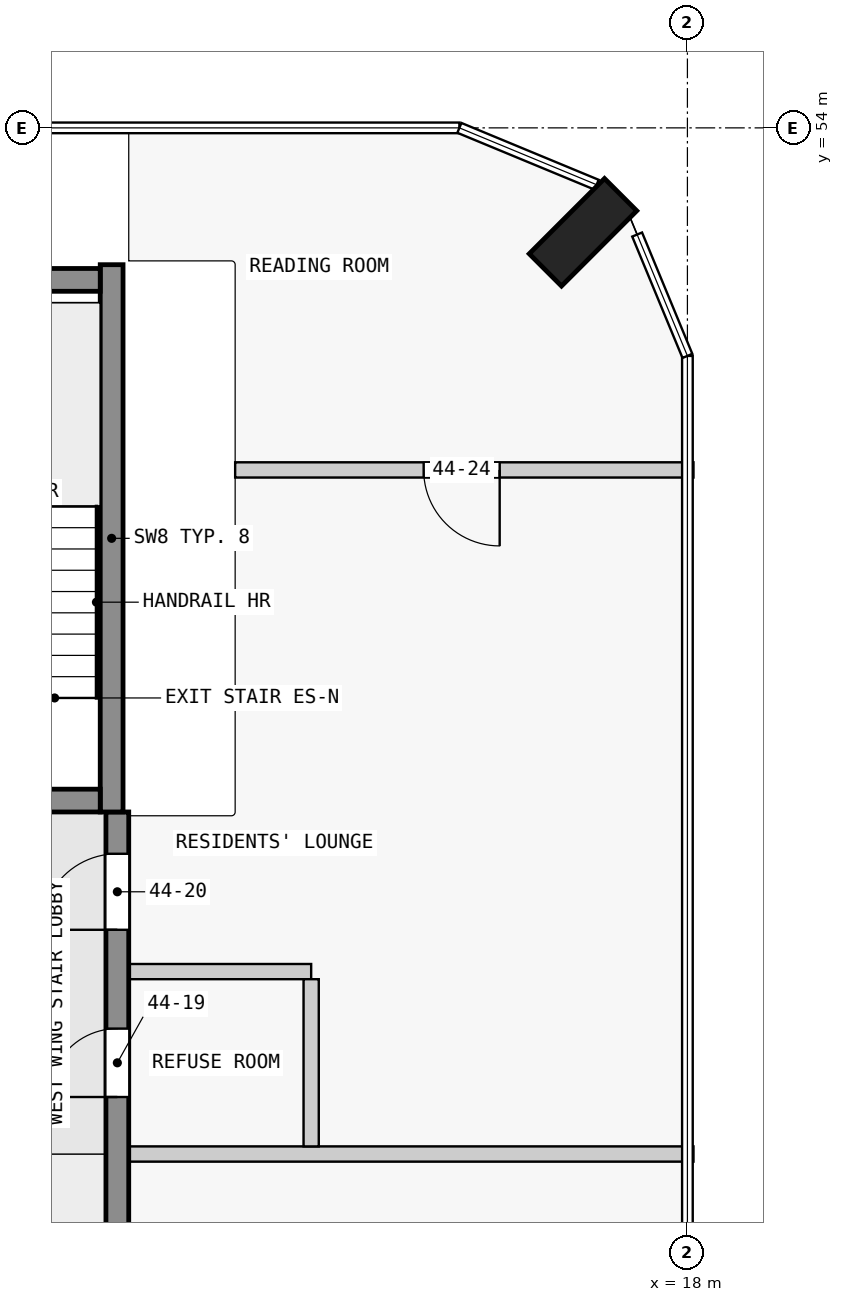
"""IFC4 building model, lengths in metres.
Left out: names, types, materials, properties, quantities, classifications, styles, units other than length and angle.
Written with IfcOpenShell. Run it as: python <this file> out.ifc"""

import sys

from ifc_helpers import new_model, si_unit, direction, frame, frame_2d, origin, origin_2d, place, context, subcontext, project, spatial, rectangle, extrude, element, fill, save


model = new_model("IFC4")
c1 = context("Model", 3, precision=1e-05, world=origin(), true_north=direction((0.0, 1.0)))
c2 = subcontext(c1, "Body", "Model", "MODEL_VIEW")
j1 = project(units=[si_unit("LENGTHUNIT", "METRE"), si_unit("PLANEANGLEUNIT", "RADIAN")], contexts=[c1])
p1 = place(None, origin())
s1 = spatial("IfcSite", under=j1, at=p1, CompositionType="ELEMENT")
p2 = place(p1, origin())
s2 = spatial("IfcBuilding", under=s1, at=p2, CompositionType="ELEMENT")
p3 = place(p2, frame((0.0, 0.0, 170.9)))
s3 = spatial("IfcBuildingStorey", under=s2, at=p3, CompositionType="ELEMENT", Elevation=170.9)
p4 = place(p3, frame((16.626, 52.626, 0.0), z_axis=(0.0, 0.0, 1.0), x_axis=(-0.707106781187, 0.707106781187, 0.0)))
e1 = element("IfcColumn", 1, at=p4, inside=s3, PredefinedType="COLUMN", context=c2, shape_type="SweptSolid", body=[
    extrude(rectangle(XDim=0.6, YDim=1.4, at=origin_2d()), origin(), (0.0, 0.0, 1.0), 3.5),
])
p5 = place(p3, frame((7.725, 45.15, 0.0), z_axis=(0.0, 0.0, 1.0), x_axis=(1.0, 0.0, 0.0)))
e2 = element("IfcWall", 2, at=p5, inside=s3, PredefinedType="SHEAR", context=c2, shape_type="SweptSolid", body=[
    extrude(rectangle(XDim=2.55, YDim=0.3, at=frame_2d((1.275, 0.0))), origin(), (0.0, 0.0, 1.0), 3.5),
])
p6 = place(p5, frame((0.725, 0.0, 0.0)))
e3 = element("IfcOpeningElement", 3, at=p6, cuts=e2, PredefinedType="OPENING", context=c2, shape_type="SweptSolid", body=[
    extrude(rectangle(XDim=1.1, YDim=2.1, at=frame_2d((0.55, 1.05))), frame((0.0, 0.16, 0.0), z_axis=(0.0, -1.0, 0.0), x_axis=(1.0, 0.0, 0.0)), (0.0, 0.0, 1.0), 0.32),
])
p7 = place(p3, frame((7.725, 52.0, 0.0), z_axis=(0.0, 0.0, 1.0), x_axis=(1.0, 0.0, 0.0)))
e4 = element("IfcWall", 4, at=p7, inside=s3, PredefinedType="SHEAR", context=c2, shape_type="SweptSolid", body=[
    extrude(rectangle(XDim=2.55, YDim=0.3, at=frame_2d((1.275, 0.0))), origin(), (0.0, 0.0, 1.0), 3.5),
])
p8 = place(p3, frame((10.425, 45.0, 0.0), z_axis=(0.0, 0.0, 1.0), x_axis=(0.0, 1.0, 0.0)))
e5 = element("IfcWall", 5, at=p8, inside=s3, PredefinedType="SHEAR", context=c2, shape_type="SweptSolid", body=[
    extrude(rectangle(XDim=7.2, YDim=0.3, at=frame_2d((3.6, 0.0))), origin(), (0.0, 0.0, 1.0), 3.5),
])
p9 = place(p3, frame((10.5, 18.0, 0.0), z_axis=(0.0, 0.0, 1.0), x_axis=(0.0, 1.0, 0.0)))
e6 = element("IfcWall", 6, at=p9, inside=s3, PredefinedType="SHEAR", context=c2, shape_type="SweptSolid", body=[
    extrude(rectangle(XDim=27.0, YDim=0.3, at=frame_2d((13.5, 0.0))), origin(), (0.0, 0.0, 1.0), 3.25),
])
p10 = place(p9, frame((1.75, 0.0, 0.0)))
e7 = element("IfcOpeningElement", 7, at=p10, cuts=e6, PredefinedType="OPENING", context=c2, shape_type="SweptSolid", body=[
    extrude(rectangle(XDim=1.0, YDim=2.1, at=frame_2d((0.5, 1.05))), frame((0.0, 0.16, 0.0), z_axis=(0.0, -1.0, 0.0), x_axis=(1.0, 0.0, 0.0)), (0.0, 0.0, 1.0), 0.32),
])
p11 = place(p9, frame((6.25, 0.0, 0.0)))
e8 = element("IfcOpeningElement", 8, at=p11, cuts=e6, PredefinedType="OPENING", context=c2, shape_type="SweptSolid", body=[
    extrude(rectangle(XDim=1.0, YDim=2.1, at=frame_2d((0.5, 1.05))), frame((0.0, 0.16, 0.0), z_axis=(0.0, -1.0, 0.0), x_axis=(1.0, 0.0, 0.0)), (0.0, 0.0, 1.0), 0.32),
])
p12 = place(p9, frame((10.75, 0.0, 0.0)))
e9 = element("IfcOpeningElement", 9, at=p12, cuts=e6, PredefinedType="OPENING", context=c2, shape_type="SweptSolid", body=[
    extrude(rectangle(XDim=1.0, YDim=2.1, at=frame_2d((0.5, 1.05))), frame((0.0, 0.16, 0.0), z_axis=(0.0, -1.0, 0.0), x_axis=(1.0, 0.0, 0.0)), (0.0, 0.0, 1.0), 0.32),
])
p13 = place(p9, frame((15.25, 0.0, 0.0)))
e10 = element("IfcOpeningElement", 10, at=p13, cuts=e6, PredefinedType="OPENING", context=c2, shape_type="SweptSolid", body=[
    extrude(rectangle(XDim=1.0, YDim=2.1, at=frame_2d((0.5, 1.05))), frame((0.0, 0.16, 0.0), z_axis=(0.0, -1.0, 0.0), x_axis=(1.0, 0.0, 0.0)), (0.0, 0.0, 1.0), 0.32),
])
p14 = place(p9, frame((19.75, 0.0, 0.0)))
e11 = element("IfcOpeningElement", 11, at=p14, cuts=e6, PredefinedType="OPENING", context=c2, shape_type="SweptSolid", body=[
    extrude(rectangle(XDim=1.0, YDim=2.1, at=frame_2d((0.5, 1.05))), frame((0.0, 0.16, 0.0), z_axis=(0.0, -1.0, 0.0), x_axis=(1.0, 0.0, 0.0)), (0.0, 0.0, 1.0), 0.32),
])
p15 = place(p9, frame((23.25, 0.0, 0.0)))
e12 = element("IfcOpeningElement", 12, at=p15, cuts=e6, PredefinedType="OPENING", context=c2, shape_type="SweptSolid", body=[
    extrude(rectangle(XDim=0.9, YDim=2.1, at=frame_2d((0.45, 1.05))), frame((0.0, 0.16, 0.0), z_axis=(0.0, -1.0, 0.0), x_axis=(1.0, 0.0, 0.0)), (0.0, 0.0, 1.0), 0.32),
])
p16 = place(p9, frame((25.45, 0.0, 0.0)))
e13 = element("IfcOpeningElement", 13, at=p16, cuts=e6, PredefinedType="OPENING", context=c2, shape_type="SweptSolid", body=[
    extrude(rectangle(XDim=1.0, YDim=2.1, at=frame_2d((0.5, 1.05))), frame((0.0, 0.16, 0.0), z_axis=(0.0, -1.0, 0.0), x_axis=(1.0, 0.0, 0.0)), (0.0, 0.0, 1.0), 0.32),
])
p17 = place(p3, frame((18.08, 40.5, 0.0), z_axis=(0.0, 0.0, 1.0), x_axis=(-1.0, 0.0, 0.0)))
e14 = element("IfcWall", 14, at=p17, inside=s3, PredefinedType="PARTITIONING", context=c2, shape_type="SweptSolid", body=[
    extrude(rectangle(XDim=7.43, YDim=0.2, at=frame_2d((3.715, 0.0))), origin(), (0.0, 0.0, 1.0), 3.25),
])
p18 = place(p3, frame((13.05, 42.9, 0.0), z_axis=(0.0, 0.0, 1.0), x_axis=(-1.0, 0.0, 0.0)))
e15 = element("IfcWall", 15, at=p18, inside=s3, PredefinedType="PARTITIONING", context=c2, shape_type="SweptSolid", body=[
    extrude(rectangle(XDim=2.4, YDim=0.2, at=frame_2d((1.2, 0.0))), origin(), (0.0, 0.0, 1.0), 3.25),
])
p19 = place(p3, frame((18.08, 49.5, 0.0), z_axis=(0.0, 0.0, 1.0), x_axis=(-1.0, 0.0, 0.0)))
e16 = element("IfcWall", 16, at=p19, inside=s3, PredefinedType="PARTITIONING", context=c2, shape_type="SweptSolid", body=[
    extrude(rectangle(XDim=6.03, YDim=0.2, at=frame_2d((3.015, 0.0))), origin(), (0.0, 0.0, 1.0), 3.25),
])
p20 = place(p19, frame((2.55, 0.0, 0.0)))
e17 = element("IfcOpeningElement", 17, at=p20, cuts=e16, PredefinedType="OPENING", context=c2, shape_type="SweptSolid", body=[
    extrude(rectangle(XDim=1.0, YDim=2.1, at=frame_2d((0.5, 1.05))), frame((0.0, 0.11, 0.0), z_axis=(0.0, -1.0, 0.0), x_axis=(1.0, 0.0, 0.0)), (0.0, 0.0, 1.0), 0.22),
])
p21 = place(p3, frame((13.05, 40.6, 0.0), z_axis=(0.0, 0.0, 1.0), x_axis=(0.0, 1.0, 0.0)))
e18 = element("IfcWall", 18, at=p21, inside=s3, PredefinedType="PARTITIONING", context=c2, shape_type="SweptSolid", body=[
    extrude(rectangle(XDim=2.2, YDim=0.2, at=frame_2d((1.1, 0.0))), origin(), (0.0, 0.0, 1.0), 3.25),
])
p22 = place(p15, origin())
e19 = element("IfcDoor", 19, at=p22, inside=s3, OperationType="SINGLE_SWING_RIGHT", PredefinedType="DOOR", context=c2, shape_type="SweptSolid", body=[
    extrude(rectangle(XDim=0.9, YDim=2.1, at=frame_2d((0.45, 1.05))), frame((0.0, 0.025, 0.0), z_axis=(0.0, -1.0, 0.0), x_axis=(1.0, 0.0, 0.0)), (0.0, 0.0, 1.0), 0.05),
])
fill(e12, e19)
p23 = place(p16, origin())
e20 = element("IfcDoor", 20, at=p23, inside=s3, OperationType="SINGLE_SWING_RIGHT", PredefinedType="DOOR", context=c2, shape_type="SweptSolid", body=[
    extrude(rectangle(XDim=1.0, YDim=2.1, at=frame_2d((0.5, 1.05))), frame((0.0, 0.025, 0.0), z_axis=(0.0, -1.0, 0.0), x_axis=(1.0, 0.0, 0.0)), (0.0, 0.0, 1.0), 0.05),
])
fill(e13, e20)
p24 = place(p20, origin())
e21 = element("IfcDoor", 21, at=p24, inside=s3, OperationType="SINGLE_SWING_RIGHT", PredefinedType="DOOR", context=c2, shape_type="SweptSolid", body=[
    extrude(rectangle(XDim=1.0, YDim=2.1, at=frame_2d((0.5, 1.05))), frame((0.0, 0.025, 0.0), z_axis=(0.0, -1.0, 0.0), x_axis=(1.0, 0.0, 0.0)), (0.0, 0.0, 1.0), 0.05),
])
fill(e17, e21)
save(model, sys.argv[1])
